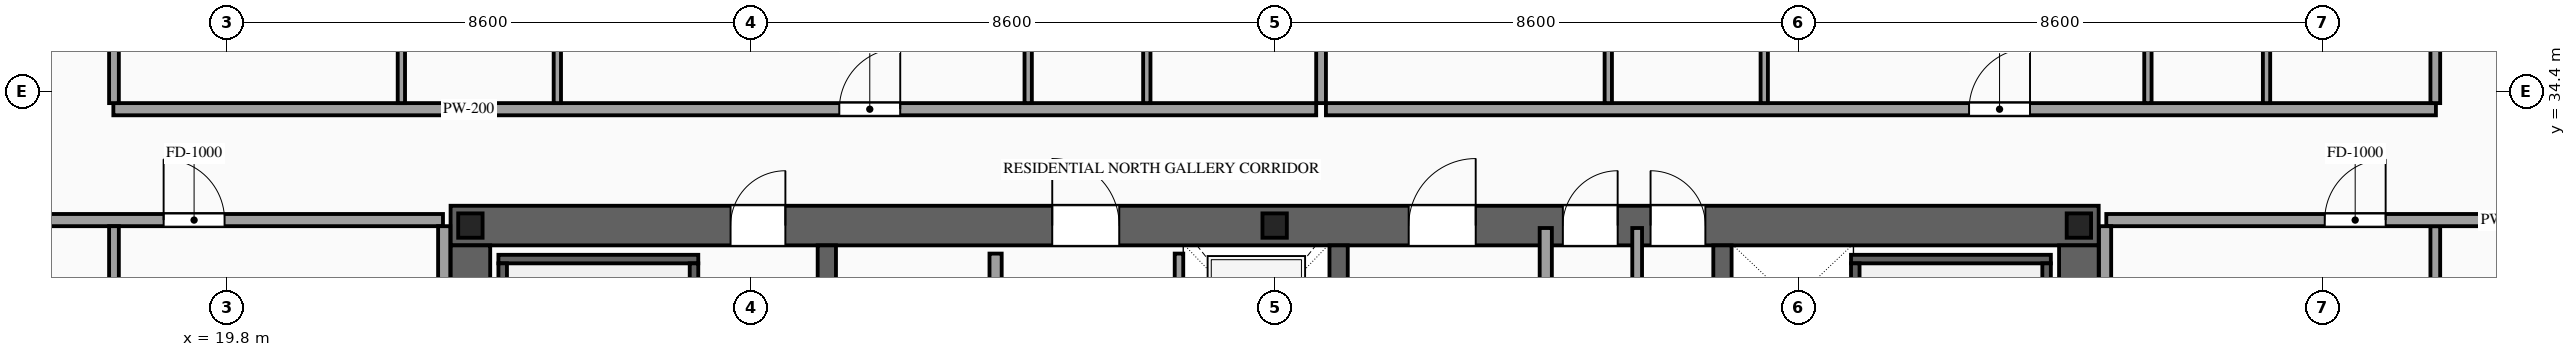
"""IFC4 building model, lengths in metres.
Left out: names, types, materials, properties, quantities, classifications, styles, units other than length and angle.
Written with IfcOpenShell. Run it as: python <this file> out.ifc"""

import sys

from ifc_helpers import new_model, si_unit, direction, frame, frame_2d, origin, origin_2d, place, context, subcontext, project, spatial, rectangle, i_section, extrude, source, transform, mapped, element, fill, save


model = new_model("IFC4")
c1 = context("Model", 3, precision=1e-05, world=origin(), true_north=direction((0.0, 1.0)))
c2 = subcontext(c1, "Body", "Model", "MODEL_VIEW")
j1 = project(units=[si_unit("LENGTHUNIT", "METRE"), si_unit("PLANEANGLEUNIT", "RADIAN")], contexts=[c1])
p1 = place(None, origin())
s1 = spatial("IfcSite", under=j1, at=p1, CompositionType="ELEMENT")
p2 = place(p1, origin())
s2 = spatial("IfcBuilding", under=s1, at=p2, CompositionType="ELEMENT")
p3 = place(p2, frame((0.0, 0.0, 191.5)))
s3 = spatial("IfcBuildingStorey", under=s2, at=p3, CompositionType="ELEMENT", Elevation=191.5)
p4 = place(p3, frame((23.475, 32.2, 0.0), z_axis=(0.0, 0.0, 1.0), x_axis=(1.0, 0.0, 0.0)))
e1 = element("IfcWall", 1, at=p4, inside=s3, PredefinedType="SHEAR", context=c2, shape_type="SweptSolid", body=[
    extrude(rectangle(XDim=27.05, YDim=0.65, at=frame_2d((13.525, 0.0))), origin(), (0.0, 0.0, 1.0), 3.5),
])
p5 = place(p4, frame((4.595, 0.0, 0.0)))
e2 = element("IfcOpeningElement", 2, at=p5, cuts=e1, PredefinedType="OPENING", context=c2, shape_type="SweptSolid", body=[
    extrude(rectangle(XDim=0.9, YDim=2.15, at=frame_2d((0.45, 1.075))), frame((0.0, 0.34, 0.0), z_axis=(0.0, -1.0, 0.0), x_axis=(1.0, 0.0, 0.0)), (0.0, 0.0, 1.0), 0.68),
])
p6 = place(p4, frame((9.875, 0.0, 0.0)))
e3 = element("IfcOpeningElement", 3, at=p6, cuts=e1, PredefinedType="OPENING", context=c2, shape_type="SweptSolid", body=[
    extrude(rectangle(XDim=1.1, YDim=2.2, at=frame_2d((0.55, 1.1))), frame((0.0, 0.34, 0.0), z_axis=(0.0, -1.0, 0.0), x_axis=(1.0, 0.0, 0.0)), (0.0, 0.0, 1.0), 0.68),
])
p7 = place(p4, frame((15.725, 0.0, 0.0)))
e4 = element("IfcOpeningElement", 4, at=p7, cuts=e1, PredefinedType="OPENING", context=c2, shape_type="SweptSolid", body=[
    extrude(rectangle(XDim=1.1, YDim=2.2, at=frame_2d((0.55, 1.1))), frame((0.0, 0.34, 0.0), z_axis=(0.0, -1.0, 0.0), x_axis=(1.0, 0.0, 0.0)), (0.0, 0.0, 1.0), 0.68),
])
p8 = place(p4, frame((18.255, 0.0, 0.0)))
e5 = element("IfcOpeningElement", 5, at=p8, cuts=e1, PredefinedType="OPENING", context=c2, shape_type="SweptSolid", body=[
    extrude(rectangle(XDim=0.9, YDim=2.15, at=frame_2d((0.45, 1.075))), frame((0.0, 0.34, 0.0), z_axis=(0.0, -1.0, 0.0), x_axis=(1.0, 0.0, 0.0)), (0.0, 0.0, 1.0), 0.68),
])
p9 = place(p4, frame((19.695, 0.0, 0.0)))
e6 = element("IfcOpeningElement", 6, at=p9, cuts=e1, PredefinedType="OPENING", context=c2, shape_type="SweptSolid", body=[
    extrude(rectangle(XDim=0.9, YDim=2.15, at=frame_2d((0.45, 1.075))), frame((0.0, 0.34, 0.0), z_axis=(0.0, -1.0, 0.0), x_axis=(1.0, 0.0, 0.0)), (0.0, 0.0, 1.0), 0.68),
])
m1 = source(origin(), c2, "Body", "SweptSolid", [
    extrude(rectangle(XDim=12.15, YDim=0.65, at=frame_2d((6.075, 0.0))), origin(), (0.0, 0.0, 1.0), 3.5),
])
for number, where, z_axis, x_axis in (
    (7, (23.8, 19.725, 0.0), (0.0, 0.0, 1.0), (0.0, 1.0, 0.0)),
    (8, (50.2, 19.725, 0.0), (0.0, 0.0, 1.0), (0.0, 1.0, 0.0)),
):
    element("IfcWall", number, at=place(p3, frame(where, z_axis=z_axis, x_axis=x_axis)), inside=s3, PredefinedType="SHEAR", context=c2, shape_type="MappedRepresentation", body=[
        mapped(m1, transform((0.0, 0.0, 0.0), scale=1.0)),
    ])
m2 = source(origin(), c2, "Body", "SweptSolid", [
    extrude(rectangle(XDim=12.15, YDim=0.3, at=frame_2d((6.075, 0.0))), origin(), (0.0, 0.0, 1.0), 3.5),
])
for number, where, z_axis, x_axis in (
    (9, (29.65, 19.725, 0.0), (0.0, 0.0, 1.0), (0.0, 1.0, 0.0)),
    (10, (38.05, 19.725, 0.0), (0.0, 0.0, 1.0), (0.0, 1.0, 0.0)),
    (11, (44.35, 19.725, 0.0), (0.0, 0.0, 1.0), (0.0, 1.0, 0.0)),
):
    element("IfcWall", number, at=place(p3, frame(where, z_axis=z_axis, x_axis=x_axis)), inside=s3, PredefinedType="SOLIDWALL", context=c2, shape_type="MappedRepresentation", body=[
        mapped(m2, transform((0.0, 0.0, 0.0), scale=1.0)),
    ])
m3 = source(origin(), c2, "Body", "SweptSolid", [
    extrude(i_section(OverallWidth=0.4, OverallDepth=0.4, WebThickness=0.013, FlangeThickness=0.021, at=origin_2d()), origin(), (0.0, 0.0, 1.0), 3.5),
])
for number, where, z_axis, x_axis in (
    (12, (23.8, 32.2, 0.0), (0.0, 0.0, 1.0), (1.0, 0.0, 0.0)),
    (13, (37.0, 32.2, 0.0), (0.0, 0.0, 1.0), (1.0, 0.0, 0.0)),
    (14, (50.2, 32.2, 0.0), (0.0, 0.0, 1.0), (1.0, 0.0, 0.0)),
):
    element("IfcColumn", number, at=place(p3, frame(where, z_axis=z_axis, x_axis=x_axis)), inside=s3, PredefinedType="COLUMN", context=c2, shape_type="MappedRepresentation", body=[
        mapped(m3, transform((0.0, 0.0, 0.0), scale=1.0)),
    ])
p10 = place(p3, frame((35.43, 29.4, 0.0), z_axis=(0.0, 0.0, 1.0), x_axis=(0.0, 1.0, 0.0)))
e15 = element("IfcWall", 15, at=p10, inside=s3, PredefinedType="SOLIDWALL", context=c2, shape_type="SweptSolid", body=[
    extrude(rectangle(XDim=2.34, YDim=0.14, at=frame_2d((1.17, 0.0))), origin(), (0.0, 0.0, 1.0), 3.28),
])
p11 = place(p10, frame((0.62, 0.0, 0.0)))
e16 = element("IfcOpeningElement", 16, at=p11, cuts=e15, PredefinedType="OPENING", context=c2, shape_type="SweptSolid", body=[
    extrude(rectangle(XDim=1.1, YDim=2.2, at=frame_2d((0.55, 1.1))), frame((0.0, 0.085, 0.0), z_axis=(0.0, -1.0, 0.0), x_axis=(1.0, 0.0, 0.0)), (0.0, 0.0, 1.0), 0.17),
])
m4 = source(origin(), c2, "Body", "SweptSolid", [
    extrude(rectangle(XDim=3.28, YDim=0.14, at=frame_2d((1.64, 0.0))), origin(), (0.0, 0.0, 1.0), 3.28),
])
p12 = place(p3, frame((24.26, 31.65, 0.0), z_axis=(0.0, 0.0, 1.0), x_axis=(1.0, 0.0, 0.0)))
e17 = element("IfcWall", 17, at=p12, inside=s3, PredefinedType="SOLIDWALL", context=c2, shape_type="MappedRepresentation", body=[
    mapped(m4, transform((0.0, 0.0, 0.0), scale=1.0)),
])
m5 = source(origin(), c2, "Body", "SweptSolid", [
    extrude(rectangle(XDim=8.94, YDim=0.14, at=frame_2d((4.47, 0.0))), origin(), (0.0, 0.0, 1.0), 3.28),
])
for number, where, z_axis, x_axis in (
    (18, (24.33, 22.64, 0.0), (0.0, 0.0, 1.0), (0.0, 1.0, 0.0)),
    (19, (27.47, 22.64, 0.0), (0.0, 0.0, 1.0), (0.0, 1.0, 0.0)),
):
    element("IfcWall", number, at=place(p3, frame(where, z_axis=z_axis, x_axis=x_axis)), inside=s3, PredefinedType="SOLIDWALL", context=c2, shape_type="MappedRepresentation", body=[
        mapped(m5, transform((0.0, 0.0, 0.0), scale=1.0)),
    ])
p13 = place(p3, frame((46.46, 31.65, 0.0), z_axis=(0.0, 0.0, 1.0), x_axis=(1.0, 0.0, 0.0)))
e20 = element("IfcWall", 20, at=p13, inside=s3, PredefinedType="SOLIDWALL", context=c2, shape_type="MappedRepresentation", body=[
    mapped(m4, transform((0.0, 0.0, 0.0), scale=1.0)),
])
for number, where, z_axis, x_axis in (
    (21, (46.53, 22.64, 0.0), (0.0, 0.0, 1.0), (0.0, 1.0, 0.0)),
    (22, (49.67, 22.64, 0.0), (0.0, 0.0, 1.0), (0.0, 1.0, 0.0)),
):
    element("IfcWall", number, at=place(p3, frame(where, z_axis=z_axis, x_axis=x_axis)), inside=s3, PredefinedType="SOLIDWALL", context=c2, shape_type="MappedRepresentation", body=[
        mapped(m5, transform((0.0, 0.0, 0.0), scale=1.0)),
    ])
p14 = place(p3, frame((32.42, 28.05, 0.0), z_axis=(0.0, 0.0, 1.0), x_axis=(0.0, 1.0, 0.0)))
e23 = element("IfcWall", 23, at=p14, inside=s3, PredefinedType="PARTITIONING", context=c2, shape_type="SweptSolid", body=[
    extrude(rectangle(XDim=3.69, YDim=0.2, at=frame_2d((1.845, 0.0))), origin(), (0.0, 0.0, 1.0), 3.28),
])
p15 = place(p14, frame((1.395, 0.0, 0.0)))
e24 = element("IfcOpeningElement", 24, at=p15, cuts=e23, PredefinedType="OPENING", context=c2, shape_type="SweptSolid", body=[
    extrude(rectangle(XDim=0.9, YDim=2.15, at=frame_2d((0.45, 1.075))), frame((0.0, 0.115, 0.0), z_axis=(0.0, -1.0, 0.0), x_axis=(1.0, 0.0, 0.0)), (0.0, 0.0, 1.0), 0.23),
])
m6 = source(origin(), c2, "Body", "SweptSolid", [
    extrude(rectangle(XDim=5.96, YDim=0.2, at=frame_2d((2.98, 0.0))), origin(), (0.0, 0.0, 1.0), 3.28),
])
p16 = place(p3, frame((41.45, 26.2, 0.0), z_axis=(0.0, 0.0, 1.0), x_axis=(0.0, 1.0, 0.0)))
e25 = element("IfcWall", 25, at=p16, inside=s3, PredefinedType="PARTITIONING", context=c2, shape_type="MappedRepresentation", body=[
    mapped(m6, transform((0.0, 0.0, 0.0), scale=1.0)),
])
m7 = source(origin(), c2, "Body", "SweptSolid", [
    extrude(rectangle(XDim=5.96, YDim=0.16, at=frame_2d((2.98, 0.0))), origin(), (0.0, 0.0, 1.0), 3.28),
])
p17 = place(p3, frame((42.95, 26.2, 0.0), z_axis=(0.0, 0.0, 1.0), x_axis=(0.0, 1.0, 0.0)))
e26 = element("IfcWall", 26, at=p17, inside=s3, PredefinedType="PARTITIONING", context=c2, shape_type="MappedRepresentation", body=[
    mapped(m7, transform((0.0, 0.0, 0.0), scale=1.0)),
])
p18 = place(p3, frame((17.94, 34.11, 0.0), z_axis=(0.0, 0.0, 1.0), x_axis=(1.0, 0.0, 0.0)))
e27 = element("IfcWall", 27, at=p18, inside=s3, PredefinedType="PARTITIONING", context=c2, shape_type="SweptSolid", body=[
    extrude(rectangle(XDim=19.742, YDim=0.2, at=frame_2d((9.871, 0.0))), origin(), (0.0, 0.0, 1.0), 3.28),
])
p19 = place(p18, frame((11.915, 0.0, 0.0)))
e28 = element("IfcOpeningElement", 28, at=p19, cuts=e27, PredefinedType="OPENING", context=c2, shape_type="SweptSolid", body=[
    extrude(rectangle(XDim=1.0, YDim=2.2, at=frame_2d((0.5, 1.1))), frame((0.0, 0.115, 0.0), z_axis=(0.0, -1.0, 0.0), x_axis=(1.0, 0.0, 0.0)), (0.0, 0.0, 1.0), 0.23),
])
m8 = source(origin(), c2, "Body", "SweptSolid", [
    extrude(rectangle(XDim=13.54, YDim=0.16, at=frame_2d((6.77, 0.0))), origin(), (0.0, 0.0, 1.0), 3.28),
])
p20 = place(p3, frame((37.762, 34.21, 0.0), z_axis=(0.0, 0.0, 1.0), x_axis=(0.0, 1.0, 0.0)))
e29 = element("IfcWall", 29, at=p20, inside=s3, PredefinedType="PARTITIONING", context=c2, shape_type="MappedRepresentation", body=[
    mapped(m8, transform((0.0, 0.0, 0.0), scale=1.0)),
])
m9 = source(origin(), c2, "Body", "SweptSolid", [
    extrude(rectangle(XDim=5.61, YDim=0.12, at=frame_2d((2.805, 0.0))), origin(), (0.0, 0.0, 1.0), 3.28),
])
p21 = place(p3, frame((22.667, 34.21, 0.0), z_axis=(0.0, 0.0, 1.0), x_axis=(0.0, 1.0, 0.0)))
e30 = element("IfcWall", 30, at=p21, inside=s3, PredefinedType="PARTITIONING", context=c2, shape_type="MappedRepresentation", body=[
    mapped(m9, transform((0.0, 0.0, 0.0), scale=1.0)),
])
p22 = place(p3, frame((25.227, 34.21, 0.0), z_axis=(0.0, 0.0, 1.0), x_axis=(0.0, 1.0, 0.0)))
e31 = element("IfcWall", 31, at=p22, inside=s3, PredefinedType="PARTITIONING", context=c2, shape_type="SweptSolid", body=[
    extrude(rectangle(XDim=5.61, YDim=0.12, at=frame_2d((2.805, 0.0))), origin(), (0.0, 0.0, 1.0), 3.28),
])
p23 = place(p22, frame((2.38, 0.0, 0.0)))
e32 = element("IfcOpeningElement", 32, at=p23, cuts=e31, PredefinedType="OPENING", context=c2, shape_type="SweptSolid", body=[
    extrude(rectangle(XDim=0.85, YDim=2.1, at=frame_2d((0.425, 1.05))), frame((0.0, 0.075, 0.0), z_axis=(0.0, -1.0, 0.0), x_axis=(1.0, 0.0, 0.0)), (0.0, 0.0, 1.0), 0.15),
])
for number, where, z_axis, x_axis in (
    (33, (34.902, 34.21, 0.0), (0.0, 0.0, 1.0), (0.0, 1.0, 0.0)),
    (34, (32.955, 34.21, 0.0), (0.0, 0.0, 1.0), (0.0, 1.0, 0.0)),
):
    element("IfcWall", number, at=place(p3, frame(where, z_axis=z_axis, x_axis=x_axis)), inside=s3, PredefinedType="PARTITIONING", context=c2, shape_type="MappedRepresentation", body=[
        mapped(m9, transform((0.0, 0.0, 0.0), scale=1.0)),
    ])
p24 = place(p3, frame((37.842, 34.11, 0.0), z_axis=(0.0, 0.0, 1.0), x_axis=(1.0, 0.0, 0.0)))
e35 = element("IfcWall", 35, at=p24, inside=s3, PredefinedType="PARTITIONING", context=c2, shape_type="SweptSolid", body=[
    extrude(rectangle(XDim=18.218, YDim=0.2, at=frame_2d((9.109, 0.0))), origin(), (0.0, 0.0, 1.0), 3.28),
])
p25 = place(p24, frame((10.556, 0.0, 0.0)))
e36 = element("IfcOpeningElement", 36, at=p25, cuts=e35, PredefinedType="OPENING", context=c2, shape_type="SweptSolid", body=[
    extrude(rectangle(XDim=1.0, YDim=2.2, at=frame_2d((0.5, 1.1))), frame((0.0, 0.115, 0.0), z_axis=(0.0, -1.0, 0.0), x_axis=(1.0, 0.0, 0.0)), (0.0, 0.0, 1.0), 0.23),
])
m10 = source(origin(), c2, "Body", "SweptSolid", [
    extrude(rectangle(XDim=13.39, YDim=0.16, at=frame_2d((6.695, 0.0))), origin(), (0.0, 0.0, 1.0), 3.28),
])
for number, where, z_axis, x_axis in (
    (37, (17.95, 34.21, 0.0), (0.0, 0.0, 1.0), (0.0, 1.0, 0.0)),
    (38, (56.05, 34.21, 0.0), (0.0, 0.0, 1.0), (0.0, 1.0, 0.0)),
):
    element("IfcWall", number, at=place(p3, frame(where, z_axis=z_axis, x_axis=x_axis)), inside=s3, PredefinedType="PARTITIONING", context=c2, shape_type="MappedRepresentation", body=[
        mapped(m10, transform((0.0, 0.0, 0.0), scale=1.0)),
    ])
p26 = place(p3, frame((42.476, 34.21, 0.0), z_axis=(0.0, 0.0, 1.0), x_axis=(0.0, 1.0, 0.0)))
e39 = element("IfcWall", 39, at=p26, inside=s3, PredefinedType="PARTITIONING", context=c2, shape_type="MappedRepresentation", body=[
    mapped(m9, transform((0.0, 0.0, 0.0), scale=1.0)),
])
p27 = place(p3, frame((45.036, 34.21, 0.0), z_axis=(0.0, 0.0, 1.0), x_axis=(0.0, 1.0, 0.0)))
e40 = element("IfcWall", 40, at=p27, inside=s3, PredefinedType="PARTITIONING", context=c2, shape_type="SweptSolid", body=[
    extrude(rectangle(XDim=5.61, YDim=0.12, at=frame_2d((2.805, 0.0))), origin(), (0.0, 0.0, 1.0), 3.28),
])
p28 = place(p27, frame((2.38, 0.0, 0.0)))
e41 = element("IfcOpeningElement", 41, at=p28, cuts=e40, PredefinedType="OPENING", context=c2, shape_type="SweptSolid", body=[
    extrude(rectangle(XDim=0.85, YDim=2.1, at=frame_2d((0.425, 1.05))), frame((0.0, 0.075, 0.0), z_axis=(0.0, -1.0, 0.0), x_axis=(1.0, 0.0, 0.0)), (0.0, 0.0, 1.0), 0.15),
])
for number, where, z_axis, x_axis in (
    (42, (53.28, 34.21, 0.0), (0.0, 0.0, 1.0), (0.0, 1.0, 0.0)),
    (43, (51.333, 34.21, 0.0), (0.0, 0.0, 1.0), (0.0, 1.0, 0.0)),
):
    element("IfcWall", number, at=place(p3, frame(where, z_axis=z_axis, x_axis=x_axis)), inside=s3, PredefinedType="PARTITIONING", context=c2, shape_type="MappedRepresentation", body=[
        mapped(m9, transform((0.0, 0.0, 0.0), scale=1.0)),
    ])
p29 = place(p3, frame((15.05, 32.29, 0.0), z_axis=(0.0, 0.0, 1.0), x_axis=(1.0, 0.0, 0.0)))
e44 = element("IfcWall", 44, at=p29, inside=s3, PredefinedType="PARTITIONING", context=c2, shape_type="SweptSolid", body=[
    extrude(rectangle(XDim=8.3, YDim=0.2, at=frame_2d((4.15, 0.0))), origin(), (0.0, 0.0, 1.0), 2.775),
])
p30 = place(p29, frame((3.715, 0.0, 0.0)))
e45 = element("IfcOpeningElement", 45, at=p30, cuts=e44, PredefinedType="OPENING", context=c2, shape_type="SweptSolid", body=[
    extrude(rectangle(XDim=1.0, YDim=2.2, at=frame_2d((0.5, 1.1))), frame((0.0, 0.115, 0.0), z_axis=(0.0, -1.0, 0.0), x_axis=(1.0, 0.0, 0.0)), (0.0, 0.0, 1.0), 0.23),
])
m11 = source(origin(), c2, "Body", "SweptSolid", [
    extrude(rectangle(XDim=28.19, YDim=0.16, at=frame_2d((14.095, 0.0))), origin(), (0.0, 0.0, 1.0), 3.28),
])
for number, where, z_axis, x_axis in (
    (46, (17.95, 4.0, 0.0), (0.0, 0.0, 1.0), (0.0, 1.0, 0.0)),
    (47, (56.05, 4.0, 0.0), (0.0, 0.0, 1.0), (0.0, 1.0, 0.0)),
):
    element("IfcWall", number, at=place(p3, frame(where, z_axis=z_axis, x_axis=x_axis)), inside=s3, PredefinedType="PARTITIONING", context=c2, shape_type="MappedRepresentation", body=[
        mapped(m11, transform((0.0, 0.0, 0.0), scale=1.0)),
    ])
m12 = source(origin(), c2, "Body", "SweptSolid", [
    extrude(rectangle(XDim=6.29, YDim=0.2, at=frame_2d((3.145, 0.0))), origin(), (0.0, 0.0, 1.0), 3.28),
])
p31 = place(p3, frame((23.37, 25.9, 0.0), z_axis=(0.0, 0.0, 1.0), x_axis=(0.0, 1.0, 0.0)))
e48 = element("IfcWall", 48, at=p31, inside=s3, PredefinedType="PARTITIONING", context=c2, shape_type="MappedRepresentation", body=[
    mapped(m12, transform((0.0, 0.0, 0.0), scale=1.0)),
])
p32 = place(p3, frame((50.65, 32.29, 0.0), z_axis=(0.0, 0.0, 1.0), x_axis=(1.0, 0.0, 0.0)))
e49 = element("IfcWall", 49, at=p32, inside=s3, PredefinedType="PARTITIONING", context=c2, shape_type="SweptSolid", body=[
    extrude(rectangle(XDim=8.3, YDim=0.2, at=frame_2d((4.15, 0.0))), origin(), (0.0, 0.0, 1.0), 2.775),
])
p33 = place(p32, frame((3.585, 0.0, 0.0)))
e50 = element("IfcOpeningElement", 50, at=p33, cuts=e49, PredefinedType="OPENING", context=c2, shape_type="SweptSolid", body=[
    extrude(rectangle(XDim=1.0, YDim=2.2, at=frame_2d((0.5, 1.1))), frame((0.0, 0.115, 0.0), z_axis=(0.0, -1.0, 0.0), x_axis=(1.0, 0.0, 0.0)), (0.0, 0.0, 1.0), 0.23),
])
m13 = source(origin(), c2, "Body", "SweptSolid", [
    extrude(rectangle(XDim=12.78, YDim=0.2, at=frame_2d((6.39, 0.0))), origin(), (0.0, 0.0, 1.0), 3.28),
])
p34 = place(p3, frame((50.63, 19.41, 0.0), z_axis=(0.0, 0.0, 1.0), x_axis=(0.0, 1.0, 0.0)))
e51 = element("IfcWall", 51, at=p34, inside=s3, PredefinedType="PARTITIONING", context=c2, shape_type="MappedRepresentation", body=[
    mapped(m13, transform((0.0, 0.0, 0.0), scale=1.0)),
])
m14 = source(origin(), c2, "Body", "SweptSolid", [
    extrude(rectangle(XDim=0.9, YDim=2.15, at=frame_2d((0.45, 1.075))), frame((0.0, 0.025, 0.0), z_axis=(0.0, -1.0, 0.0), x_axis=(1.0, 0.0, 0.0)), (0.0, 0.0, 1.0), 0.05),
])
p35 = place(p5, origin())
e52 = element("IfcDoor", 52, at=p35, inside=s3, OperationType="SINGLE_SWING_RIGHT", PredefinedType="DOOR", context=c2, shape_type="MappedRepresentation", body=[
    mapped(m14, transform((0.0, 0.0, 0.0), scale=1.0)),
])
fill(e2, e52)
m15 = source(origin(), c2, "Body", "SweptSolid", [
    extrude(rectangle(XDim=1.1, YDim=2.2, at=frame_2d((0.55, 1.1))), frame((0.0, 0.025, 0.0), z_axis=(0.0, -1.0, 0.0), x_axis=(1.0, 0.0, 0.0)), (0.0, 0.0, 1.0), 0.05),
])
p36 = place(p6, origin())
e53 = element("IfcDoor", 53, at=p36, inside=s3, OperationType="SINGLE_SWING_LEFT", PredefinedType="DOOR", context=c2, shape_type="MappedRepresentation", body=[
    mapped(m15, transform((0.0, 0.0, 0.0), scale=1.0)),
])
fill(e3, e53)
p37 = place(p7, origin())
e54 = element("IfcDoor", 54, at=p37, inside=s3, OperationType="SINGLE_SWING_RIGHT", PredefinedType="DOOR", context=c2, shape_type="MappedRepresentation", body=[
    mapped(m15, transform((0.0, 0.0, 0.0), scale=1.0)),
])
fill(e4, e54)
p38 = place(p8, origin())
e55 = element("IfcDoor", 55, at=p38, inside=s3, OperationType="SINGLE_SWING_RIGHT", PredefinedType="DOOR", context=c2, shape_type="MappedRepresentation", body=[
    mapped(m14, transform((0.0, 0.0, 0.0), scale=1.0)),
])
fill(e5, e55)
p39 = place(p9, origin())
e56 = element("IfcDoor", 56, at=p39, inside=s3, OperationType="SINGLE_SWING_LEFT", PredefinedType="DOOR", context=c2, shape_type="MappedRepresentation", body=[
    mapped(m14, transform((0.0, 0.0, 0.0), scale=1.0)),
])
fill(e6, e56)
m16 = source(origin(), c2, "Body", "SweptSolid", [
    extrude(rectangle(XDim=1.0, YDim=2.2, at=frame_2d((0.5, 1.1))), frame((0.0, 0.025, 0.0), z_axis=(0.0, -1.0, 0.0), x_axis=(1.0, 0.0, 0.0)), (0.0, 0.0, 1.0), 0.05),
])
p40 = place(p19, origin())
e57 = element("IfcDoor", 57, at=p40, inside=s3, OperationType="SINGLE_SWING_RIGHT", PredefinedType="DOOR", context=c2, shape_type="MappedRepresentation", body=[
    mapped(m16, transform((0.0, 0.0, 0.0), scale=1.0)),
])
fill(e28, e57)
p41 = place(p25, origin())
e58 = element("IfcDoor", 58, at=p41, inside=s3, OperationType="SINGLE_SWING_RIGHT", PredefinedType="DOOR", context=c2, shape_type="MappedRepresentation", body=[
    mapped(m16, transform((0.0, 0.0, 0.0), scale=1.0)),
])
fill(e36, e58)
p42 = place(p30, origin())
e59 = element("IfcDoor", 59, at=p42, inside=s3, OperationType="SINGLE_SWING_LEFT", PredefinedType="DOOR", context=c2, shape_type="MappedRepresentation", body=[
    mapped(m16, transform((0.0, 0.0, 0.0), scale=1.0)),
])
fill(e45, e59)
p43 = place(p33, origin())
e60 = element("IfcDoor", 60, at=p43, inside=s3, OperationType="SINGLE_SWING_RIGHT", PredefinedType="DOOR", context=c2, shape_type="MappedRepresentation", body=[
    mapped(m16, transform((0.0, 0.0, 0.0), scale=1.0)),
])
fill(e50, e60)
save(model, sys.argv[1])
